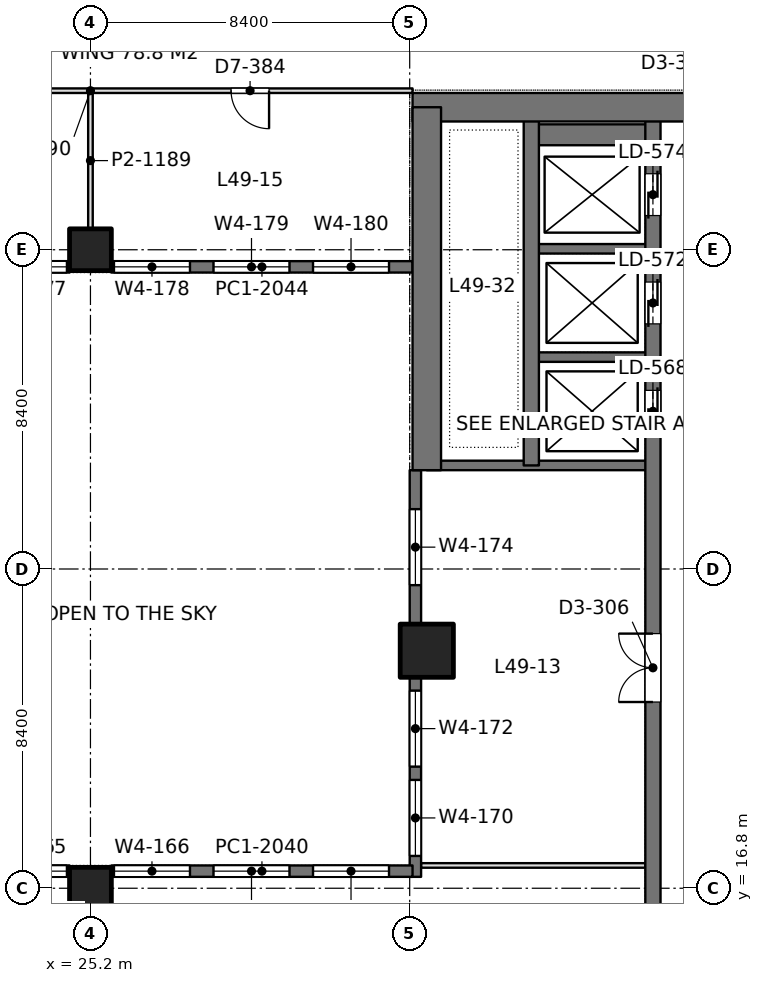
"""IFC4 building model, lengths in metres.
Left out: names, types, materials, properties, quantities, classifications, styles, units other than length and angle.
Written with IfcOpenShell. Run it as: python <this file> out.ifc"""

import sys

from ifc_helpers import new_model, si_unit, direction, frame, frame_2d, origin, origin_2d, place, context, subcontext, project, spatial, rectangle, extrude, element, fill, save


model = new_model("IFC4")
c1 = context("Model", 3, precision=1e-05, world=origin(), true_north=direction((0.0, 1.0)))
c2 = subcontext(c1, "Body", "Model", "MODEL_VIEW")
j1 = project(units=[si_unit("LENGTHUNIT", "METRE"), si_unit("PLANEANGLEUNIT", "RADIAN")], contexts=[c1])
p1 = place(None, origin())
s1 = spatial("IfcSite", under=j1, at=p1, CompositionType="ELEMENT")
p2 = place(p1, origin())
s2 = spatial("IfcBuilding", under=s1, at=p2, CompositionType="ELEMENT")
p3 = place(p2, frame((0.0, 0.0, 215.4)))
s3 = spatial("IfcBuildingStorey", under=s2, at=p3, CompositionType="ELEMENT", Elevation=215.4)
for number, where, z_axis, x_axis in (
    (1, (25.2, 16.8, 0.0), (0.0, 0.0, 1.0), (1.0, 0.0, 0.0)),
    (2, (25.2, 33.6, 0.0), (0.0, 0.0, 1.0), (1.0, 0.0, 0.0)),
):
    element("IfcColumn", number, at=place(p3, frame(where, z_axis=z_axis, x_axis=x_axis)), inside=s3, PredefinedType="COLUMN", context=c2, shape_type="SweptSolid", body=[
        extrude(rectangle(XDim=1.1, YDim=1.1, at=origin_2d()), origin(), (0.0, 0.0, 1.0), 4.2),
    ])
p4 = place(p3, frame((34.05, 23.05, 0.0), z_axis=(0.0, 0.0, 1.0), x_axis=(1.0, 0.0, 0.0)))
e3 = element("IfcColumn", 3, at=p4, inside=s3, PredefinedType="COLUMN", context=c2, shape_type="SweptSolid", body=[
    extrude(rectangle(XDim=1.4, YDim=1.4, at=origin_2d()), origin(), (0.0, 0.0, 1.0), 4.2),
])
p5 = place(p3, frame((33.675, 37.35, 0.0), z_axis=(0.0, 0.0, 1.0), x_axis=(1.0, 0.0, 0.0)))
e4 = element("IfcWall", 4, at=p5, inside=s3, PredefinedType="SHEAR", context=c2, shape_type="SweptSolid", body=[
    extrude(rectangle(XDim=17.85, YDim=0.75, at=frame_2d((8.925, 0.0))), origin(), (0.0, 0.0, 1.0), 4.2),
])
p6 = place(p5, frame((7.175, 0.0, 0.0)))
e5 = element("IfcOpeningElement", 5, at=p6, cuts=e4, PredefinedType="OPENING", context=c2, shape_type="SweptSolid", body=[
    extrude(rectangle(XDim=1.8, YDim=2.4, at=frame_2d((0.9, 1.2))), frame((0.0, 0.385, 0.0), z_axis=(0.0, -1.0, 0.0), x_axis=(1.0, 0.0, 0.0)), (0.0, 0.0, 1.0), 0.77),
])
p7 = place(p3, frame((34.05, 27.8, 0.0), z_axis=(0.0, 0.0, 1.0), x_axis=(0.0, 1.0, 0.0)))
e6 = element("IfcWall", 6, at=p7, inside=s3, PredefinedType="SHEAR", context=c2, shape_type="SweptSolid", body=[
    extrude(rectangle(XDim=9.55, YDim=0.75, at=frame_2d((4.775, 0.0))), origin(), (0.0, 0.0, 1.0), 4.2),
])
p8 = place(p3, frame((40.0, 13.05, 0.0), z_axis=(0.0, 0.0, 1.0), x_axis=(0.0, 1.0, 0.0)))
e7 = element("IfcWall", 7, at=p8, inside=s3, PredefinedType="SHEAR", context=c2, shape_type="SweptSolid", body=[
    extrude(rectangle(XDim=24.3, YDim=0.4, at=frame_2d((12.15, 0.0))), origin(), (0.0, 0.0, 1.0), 4.2),
])
p9 = place(p8, frame((15.75, 0.0, 0.0)))
e8 = element("IfcOpeningElement", 8, at=p9, cuts=e7, PredefinedType="OPENING", context=c2, shape_type="SweptSolid", body=[
    extrude(rectangle(XDim=1.1, YDim=2.2, at=frame_2d((0.55, 1.1))), frame((0.0, 0.21, 0.0), z_axis=(0.0, -1.0, 0.0), x_axis=(1.0, 0.0, 0.0)), (0.0, 0.0, 1.0), 0.42),
])
p10 = place(p8, frame((18.6, 0.0, 0.0)))
e9 = element("IfcOpeningElement", 9, at=p10, cuts=e7, PredefinedType="OPENING", context=c2, shape_type="SweptSolid", body=[
    extrude(rectangle(XDim=1.1, YDim=2.2, at=frame_2d((0.55, 1.1))), frame((0.0, 0.21, 0.0), z_axis=(0.0, -1.0, 0.0), x_axis=(1.0, 0.0, 0.0)), (0.0, 0.0, 1.0), 0.42),
])
p11 = place(p8, frame((21.45, 0.0, 0.0)))
e10 = element("IfcOpeningElement", 10, at=p11, cuts=e7, PredefinedType="OPENING", context=c2, shape_type="SweptSolid", body=[
    extrude(rectangle(XDim=1.1, YDim=2.2, at=frame_2d((0.55, 1.1))), frame((0.0, 0.21, 0.0), z_axis=(0.0, -1.0, 0.0), x_axis=(1.0, 0.0, 0.0)), (0.0, 0.0, 1.0), 0.42),
])
p12 = place(p8, frame((8.65, 0.0, 0.0)))
e11 = element("IfcOpeningElement", 11, at=p12, cuts=e7, PredefinedType="OPENING", context=c2, shape_type="SweptSolid", body=[
    extrude(rectangle(XDim=1.8, YDim=2.4, at=frame_2d((0.9, 1.2))), frame((0.0, 0.21, 0.0), z_axis=(0.0, -1.0, 0.0), x_axis=(1.0, 0.0, 0.0)), (0.0, 0.0, 1.0), 0.42),
])
p13 = place(p3, frame((36.8, 27.925, 0.0), z_axis=(0.0, 0.0, 1.0), x_axis=(0.0, 1.0, 0.0)))
e12 = element("IfcWall", 12, at=p13, inside=s3, PredefinedType="SHEAR", context=c2, shape_type="SweptSolid", body=[
    extrude(rectangle(XDim=9.425, YDim=0.4, at=frame_2d((4.712, 0.0))), origin(), (0.0, 0.0, 1.0), 4.2),
])
p14 = place(p3, frame((40.0, 27.925, 0.0), z_axis=(0.0, 0.0, 1.0), x_axis=(-1.0, 0.0, 0.0)))
e13 = element("IfcWall", 13, at=p14, inside=s3, PredefinedType="SHEAR", context=c2, shape_type="SweptSolid", body=[
    extrude(rectangle(XDim=5.95, YDim=0.25, at=frame_2d((2.975, 0.0))), origin(), (0.0, 0.0, 1.0), 4.2),
])
for number, where, z_axis, x_axis in (
    (14, (40.0, 30.775, 0.0), (0.0, 0.0, 1.0), (-1.0, 0.0, 0.0)),
    (15, (40.0, 33.625, 0.0), (0.0, 0.0, 1.0), (-1.0, 0.0, 0.0)),
):
    element("IfcWall", number, at=place(p3, frame(where, z_axis=z_axis, x_axis=x_axis)), inside=s3, PredefinedType="SHEAR", context=c2, shape_type="SweptSolid", body=[
        extrude(rectangle(XDim=3.2, YDim=0.25, at=frame_2d((1.6, 0.0))), origin(), (0.0, 0.0, 1.0), 4.2),
    ])
p15 = place(p3, frame((40.0, 36.625, 0.0), z_axis=(0.0, 0.0, 1.0), x_axis=(-1.0, 0.0, 0.0)))
e16 = element("IfcWall", 16, at=p15, inside=s3, PredefinedType="SHEAR", context=c2, shape_type="SweptSolid", body=[
    extrude(rectangle(XDim=3.2, YDim=0.55, at=frame_2d((1.6, 0.0))), origin(), (0.0, 0.0, 1.0), 4.2),
])
p16 = place(p3, frame((33.75, 17.1, 0.0), z_axis=(0.0, 0.0, 1.0), x_axis=(0.0, 1.0, 0.0)))
e17 = element("IfcWall", 17, at=p16, inside=s3, PredefinedType="SOLIDWALL", context=c2, shape_type="SweptSolid", body=[
    extrude(rectangle(XDim=10.7, YDim=0.3, at=frame_2d((5.35, 0.0))), origin(), (0.0, 0.0, 1.0), 4.05),
])
p17 = place(p16, frame((0.55, 0.0, 0.9)))
e18 = element("IfcOpeningElement", 18, at=p17, cuts=e17, PredefinedType="OPENING", context=c2, shape_type="SweptSolid", body=[
    extrude(rectangle(XDim=2.0, YDim=1.9, at=frame_2d((1.0, 0.95))), frame((0.0, 0.16, 0.0), z_axis=(0.0, -1.0, 0.0), x_axis=(1.0, 0.0, 0.0)), (0.0, 0.0, 1.0), 0.32),
])
p18 = place(p16, frame((2.9, 0.0, 0.9)))
e19 = element("IfcOpeningElement", 19, at=p18, cuts=e17, PredefinedType="OPENING", context=c2, shape_type="SweptSolid", body=[
    extrude(rectangle(XDim=2.0, YDim=1.9, at=frame_2d((1.0, 0.95))), frame((0.0, 0.16, 0.0), z_axis=(0.0, -1.0, 0.0), x_axis=(1.0, 0.0, 0.0)), (0.0, 0.0, 1.0), 0.32),
])
p19 = place(p16, frame((7.675, 0.0, 0.9)))
e20 = element("IfcOpeningElement", 20, at=p19, cuts=e17, PredefinedType="OPENING", context=c2, shape_type="SweptSolid", body=[
    extrude(rectangle(XDim=2.0, YDim=1.9, at=frame_2d((1.0, 0.95))), frame((0.0, 0.16, 0.0), z_axis=(0.0, -1.0, 0.0), x_axis=(1.0, 0.0, 0.0)), (0.0, 0.0, 1.0), 0.32),
])
p20 = place(p3, frame((16.725, 17.25, 0.0), z_axis=(0.0, 0.0, 1.0), x_axis=(1.0, 0.0, 0.0)))
e21 = element("IfcWall", 21, at=p20, inside=s3, PredefinedType="SOLIDWALL", context=c2, shape_type="SweptSolid", body=[
    extrude(rectangle(XDim=7.925, YDim=0.3, at=frame_2d((3.962, 0.0))), origin(), (0.0, 0.0, 1.0), 4.05),
])
p21 = place(p20, frame((0.619, 0.0, 0.9)))
e22 = element("IfcOpeningElement", 22, at=p21, cuts=e21, PredefinedType="OPENING", context=c2, shape_type="SweptSolid", body=[
    extrude(rectangle(XDim=2.0, YDim=1.9, at=frame_2d((1.0, 0.95))), frame((0.0, 0.16, 0.0), z_axis=(0.0, -1.0, 0.0), x_axis=(1.0, 0.0, 0.0)), (0.0, 0.0, 1.0), 0.32),
])
p22 = place(p20, frame((3.238, 0.0, 0.9)))
e23 = element("IfcOpeningElement", 23, at=p22, cuts=e21, PredefinedType="OPENING", context=c2, shape_type="SweptSolid", body=[
    extrude(rectangle(XDim=2.0, YDim=1.9, at=frame_2d((1.0, 0.95))), frame((0.0, 0.16, 0.0), z_axis=(0.0, -1.0, 0.0), x_axis=(1.0, 0.0, 0.0)), (0.0, 0.0, 1.0), 0.32),
])
p23 = place(p20, frame((5.856, 0.0, 0.9)))
e24 = element("IfcOpeningElement", 24, at=p23, cuts=e21, PredefinedType="OPENING", context=c2, shape_type="SweptSolid", body=[
    extrude(rectangle(XDim=2.0, YDim=1.9, at=frame_2d((1.0, 0.95))), frame((0.0, 0.16, 0.0), z_axis=(0.0, -1.0, 0.0), x_axis=(1.0, 0.0, 0.0)), (0.0, 0.0, 1.0), 0.32),
])
p24 = place(p3, frame((25.75, 17.25, 0.0), z_axis=(0.0, 0.0, 1.0), x_axis=(1.0, 0.0, 0.0)))
e25 = element("IfcWall", 25, at=p24, inside=s3, PredefinedType="SOLIDWALL", context=c2, shape_type="SweptSolid", body=[
    extrude(rectangle(XDim=7.925, YDim=0.3, at=frame_2d((3.962, 0.0))), origin(), (0.0, 0.0, 1.0), 4.05),
])
p25 = place(p24, frame((0.069, 0.0, 0.9)))
e26 = element("IfcOpeningElement", 26, at=p25, cuts=e25, PredefinedType="OPENING", context=c2, shape_type="SweptSolid", body=[
    extrude(rectangle(XDim=2.0, YDim=1.9, at=frame_2d((1.0, 0.95))), frame((0.0, 0.16, 0.0), z_axis=(0.0, -1.0, 0.0), x_axis=(1.0, 0.0, 0.0)), (0.0, 0.0, 1.0), 0.32),
])
p26 = place(p24, frame((2.688, 0.0, 0.9)))
e27 = element("IfcOpeningElement", 27, at=p26, cuts=e25, PredefinedType="OPENING", context=c2, shape_type="SweptSolid", body=[
    extrude(rectangle(XDim=2.0, YDim=1.9, at=frame_2d((1.0, 0.95))), frame((0.0, 0.16, 0.0), z_axis=(0.0, -1.0, 0.0), x_axis=(1.0, 0.0, 0.0)), (0.0, 0.0, 1.0), 0.32),
])
p27 = place(p24, frame((5.306, 0.0, 0.9)))
e28 = element("IfcOpeningElement", 28, at=p27, cuts=e25, PredefinedType="OPENING", context=c2, shape_type="SweptSolid", body=[
    extrude(rectangle(XDim=2.0, YDim=1.9, at=frame_2d((1.0, 0.95))), frame((0.0, 0.16, 0.0), z_axis=(0.0, -1.0, 0.0), x_axis=(1.0, 0.0, 0.0)), (0.0, 0.0, 1.0), 0.32),
])
p28 = place(p3, frame((16.725, 33.15, 0.0), z_axis=(0.0, 0.0, 1.0), x_axis=(1.0, 0.0, 0.0)))
e29 = element("IfcWall", 29, at=p28, inside=s3, PredefinedType="SOLIDWALL", context=c2, shape_type="SweptSolid", body=[
    extrude(rectangle(XDim=7.925, YDim=0.3, at=frame_2d((3.962, 0.0))), origin(), (0.0, 0.0, 1.0), 4.05),
])
p29 = place(p28, frame((0.619, 0.0, 0.9)))
e30 = element("IfcOpeningElement", 30, at=p29, cuts=e29, PredefinedType="OPENING", context=c2, shape_type="SweptSolid", body=[
    extrude(rectangle(XDim=2.0, YDim=1.9, at=frame_2d((1.0, 0.95))), frame((0.0, 0.16, 0.0), z_axis=(0.0, -1.0, 0.0), x_axis=(1.0, 0.0, 0.0)), (0.0, 0.0, 1.0), 0.32),
])
p30 = place(p28, frame((3.238, 0.0, 0.9)))
e31 = element("IfcOpeningElement", 31, at=p30, cuts=e29, PredefinedType="OPENING", context=c2, shape_type="SweptSolid", body=[
    extrude(rectangle(XDim=2.0, YDim=1.9, at=frame_2d((1.0, 0.95))), frame((0.0, 0.16, 0.0), z_axis=(0.0, -1.0, 0.0), x_axis=(1.0, 0.0, 0.0)), (0.0, 0.0, 1.0), 0.32),
])
p31 = place(p28, frame((5.856, 0.0, 0.9)))
e32 = element("IfcOpeningElement", 32, at=p31, cuts=e29, PredefinedType="OPENING", context=c2, shape_type="SweptSolid", body=[
    extrude(rectangle(XDim=2.0, YDim=1.9, at=frame_2d((1.0, 0.95))), frame((0.0, 0.16, 0.0), z_axis=(0.0, -1.0, 0.0), x_axis=(1.0, 0.0, 0.0)), (0.0, 0.0, 1.0), 0.32),
])
p32 = place(p3, frame((25.75, 33.15, 0.0), z_axis=(0.0, 0.0, 1.0), x_axis=(1.0, 0.0, 0.0)))
e33 = element("IfcWall", 33, at=p32, inside=s3, PredefinedType="SOLIDWALL", context=c2, shape_type="SweptSolid", body=[
    extrude(rectangle(XDim=7.925, YDim=0.3, at=frame_2d((3.962, 0.0))), origin(), (0.0, 0.0, 1.0), 4.05),
])
p33 = place(p32, frame((0.069, 0.0, 0.9)))
e34 = element("IfcOpeningElement", 34, at=p33, cuts=e33, PredefinedType="OPENING", context=c2, shape_type="SweptSolid", body=[
    extrude(rectangle(XDim=2.0, YDim=1.9, at=frame_2d((1.0, 0.95))), frame((0.0, 0.16, 0.0), z_axis=(0.0, -1.0, 0.0), x_axis=(1.0, 0.0, 0.0)), (0.0, 0.0, 1.0), 0.32),
])
p34 = place(p32, frame((2.688, 0.0, 0.9)))
e35 = element("IfcOpeningElement", 35, at=p34, cuts=e33, PredefinedType="OPENING", context=c2, shape_type="SweptSolid", body=[
    extrude(rectangle(XDim=2.0, YDim=1.9, at=frame_2d((1.0, 0.95))), frame((0.0, 0.16, 0.0), z_axis=(0.0, -1.0, 0.0), x_axis=(1.0, 0.0, 0.0)), (0.0, 0.0, 1.0), 0.32),
])
p35 = place(p32, frame((5.306, 0.0, 0.9)))
e36 = element("IfcOpeningElement", 36, at=p35, cuts=e33, PredefinedType="OPENING", context=c2, shape_type="SweptSolid", body=[
    extrude(rectangle(XDim=2.0, YDim=1.9, at=frame_2d((1.0, 0.95))), frame((0.0, 0.16, 0.0), z_axis=(0.0, -1.0, 0.0), x_axis=(1.0, 0.0, 0.0)), (0.0, 0.0, 1.0), 0.32),
])
p36 = place(p3, frame((33.898, 17.4, 0.0), z_axis=(0.0, 0.0, 1.0), x_axis=(1.0, 0.0, 0.0)))
e37 = element("IfcWall", 37, at=p36, inside=s3, PredefinedType="PARTITIONING", context=c2, shape_type="SweptSolid", body=[
    extrude(rectangle(XDim=5.904, YDim=0.12, at=frame_2d((2.952, 0.0))), origin(), (0.0, 0.0, 1.0), 3.55),
])
p37 = place(p3, frame((25.2, 34.149, 0.0), z_axis=(0.0, 0.0, 1.0), x_axis=(0.0, 1.0, 0.0)))
e38 = element("IfcWall", 38, at=p37, inside=s3, PredefinedType="PARTITIONING", context=c2, shape_type="SweptSolid", body=[
    extrude(rectangle(XDim=3.593, YDim=0.12, at=frame_2d((1.796, 0.0))), origin(), (0.0, 0.0, 1.0), 3.55),
])
p38 = place(p3, frame((16.725, 37.785, 0.0), z_axis=(0.0, 0.0, 1.0), x_axis=(1.0, 0.0, 0.0)))
e39 = element("IfcWall", 39, at=p38, inside=s3, PredefinedType="PARTITIONING", context=c2, shape_type="SweptSolid", body=[
    extrude(rectangle(XDim=16.95, YDim=0.12, at=frame_2d((8.475, 0.0))), origin(), (0.0, 0.0, 1.0), 3.55),
])
p39 = place(p38, frame((3.775, 0.0, 0.0)))
e40 = element("IfcOpeningElement", 40, at=p39, cuts=e39, PredefinedType="OPENING", context=c2, shape_type="SweptSolid", body=[
    extrude(rectangle(XDim=1.0, YDim=2.4, at=frame_2d((0.5, 1.2))), frame((0.0, 0.07, 0.0), z_axis=(0.0, -1.0, 0.0), x_axis=(1.0, 0.0, 0.0)), (0.0, 0.0, 1.0), 0.14),
])
p40 = place(p38, frame((12.175, 0.0, 0.0)))
e41 = element("IfcOpeningElement", 41, at=p40, cuts=e39, PredefinedType="OPENING", context=c2, shape_type="SweptSolid", body=[
    extrude(rectangle(XDim=1.0, YDim=2.4, at=frame_2d((0.5, 1.2))), frame((0.0, 0.07, 0.0), z_axis=(0.0, -1.0, 0.0), x_axis=(1.0, 0.0, 0.0)), (0.0, 0.0, 1.0), 0.14),
])
p41 = place(p17, origin())
e42 = element("IfcWindow", 42, at=p41, inside=s3, PartitioningType="SINGLE_PANEL", PredefinedType="WINDOW", context=c2, shape_type="SweptSolid", body=[
    extrude(rectangle(XDim=2.0, YDim=1.9, at=frame_2d((1.0, 0.95))), frame((0.0, 0.03, 0.0), z_axis=(0.0, -1.0, 0.0), x_axis=(1.0, 0.0, 0.0)), (0.0, 0.0, 1.0), 0.06),
])
fill(e18, e42)
p42 = place(p18, origin())
e43 = element("IfcWindow", 43, at=p42, inside=s3, PartitioningType="SINGLE_PANEL", PredefinedType="WINDOW", context=c2, shape_type="SweptSolid", body=[
    extrude(rectangle(XDim=2.0, YDim=1.9, at=frame_2d((1.0, 0.95))), frame((0.0, 0.03, 0.0), z_axis=(0.0, -1.0, 0.0), x_axis=(1.0, 0.0, 0.0)), (0.0, 0.0, 1.0), 0.06),
])
fill(e19, e43)
p43 = place(p19, origin())
e44 = element("IfcWindow", 44, at=p43, inside=s3, PartitioningType="SINGLE_PANEL", PredefinedType="WINDOW", context=c2, shape_type="SweptSolid", body=[
    extrude(rectangle(XDim=2.0, YDim=1.9, at=frame_2d((1.0, 0.95))), frame((0.0, 0.03, 0.0), z_axis=(0.0, -1.0, 0.0), x_axis=(1.0, 0.0, 0.0)), (0.0, 0.0, 1.0), 0.06),
])
fill(e20, e44)
p44 = place(p23, origin())
e45 = element("IfcWindow", 45, at=p44, inside=s3, PartitioningType="SINGLE_PANEL", PredefinedType="WINDOW", context=c2, shape_type="SweptSolid", body=[
    extrude(rectangle(XDim=2.0, YDim=1.9, at=frame_2d((1.0, 0.95))), frame((0.0, 0.03, 0.0), z_axis=(0.0, -1.0, 0.0), x_axis=(1.0, 0.0, 0.0)), (0.0, 0.0, 1.0), 0.06),
])
fill(e24, e45)
p45 = place(p25, origin())
e46 = element("IfcWindow", 46, at=p45, inside=s3, PartitioningType="SINGLE_PANEL", PredefinedType="WINDOW", context=c2, shape_type="SweptSolid", body=[
    extrude(rectangle(XDim=2.0, YDim=1.9, at=frame_2d((1.0, 0.95))), frame((0.0, 0.03, 0.0), z_axis=(0.0, -1.0, 0.0), x_axis=(1.0, 0.0, 0.0)), (0.0, 0.0, 1.0), 0.06),
])
fill(e26, e46)
p46 = place(p26, origin())
e47 = element("IfcWindow", 47, at=p46, inside=s3, PartitioningType="SINGLE_PANEL", PredefinedType="WINDOW", context=c2, shape_type="SweptSolid", body=[
    extrude(rectangle(XDim=2.0, YDim=1.9, at=frame_2d((1.0, 0.95))), frame((0.0, 0.03, 0.0), z_axis=(0.0, -1.0, 0.0), x_axis=(1.0, 0.0, 0.0)), (0.0, 0.0, 1.0), 0.06),
])
fill(e27, e47)
p47 = place(p27, origin())
e48 = element("IfcWindow", 48, at=p47, inside=s3, PartitioningType="SINGLE_PANEL", PredefinedType="WINDOW", context=c2, shape_type="SweptSolid", body=[
    extrude(rectangle(XDim=2.0, YDim=1.9, at=frame_2d((1.0, 0.95))), frame((0.0, 0.03, 0.0), z_axis=(0.0, -1.0, 0.0), x_axis=(1.0, 0.0, 0.0)), (0.0, 0.0, 1.0), 0.06),
])
fill(e28, e48)
p48 = place(p31, origin())
e49 = element("IfcWindow", 49, at=p48, inside=s3, PartitioningType="SINGLE_PANEL", PredefinedType="WINDOW", context=c2, shape_type="SweptSolid", body=[
    extrude(rectangle(XDim=2.0, YDim=1.9, at=frame_2d((1.0, 0.95))), frame((0.0, 0.03, 0.0), z_axis=(0.0, -1.0, 0.0), x_axis=(1.0, 0.0, 0.0)), (0.0, 0.0, 1.0), 0.06),
])
fill(e32, e49)
p49 = place(p33, origin())
e50 = element("IfcWindow", 50, at=p49, inside=s3, PartitioningType="SINGLE_PANEL", PredefinedType="WINDOW", context=c2, shape_type="SweptSolid", body=[
    extrude(rectangle(XDim=2.0, YDim=1.9, at=frame_2d((1.0, 0.95))), frame((0.0, 0.03, 0.0), z_axis=(0.0, -1.0, 0.0), x_axis=(1.0, 0.0, 0.0)), (0.0, 0.0, 1.0), 0.06),
])
fill(e34, e50)
p50 = place(p34, origin())
e51 = element("IfcWindow", 51, at=p50, inside=s3, PartitioningType="SINGLE_PANEL", PredefinedType="WINDOW", context=c2, shape_type="SweptSolid", body=[
    extrude(rectangle(XDim=2.0, YDim=1.9, at=frame_2d((1.0, 0.95))), frame((0.0, 0.03, 0.0), z_axis=(0.0, -1.0, 0.0), x_axis=(1.0, 0.0, 0.0)), (0.0, 0.0, 1.0), 0.06),
])
fill(e35, e51)
p51 = place(p35, origin())
e52 = element("IfcWindow", 52, at=p51, inside=s3, PartitioningType="SINGLE_PANEL", PredefinedType="WINDOW", context=c2, shape_type="SweptSolid", body=[
    extrude(rectangle(XDim=2.0, YDim=1.9, at=frame_2d((1.0, 0.95))), frame((0.0, 0.03, 0.0), z_axis=(0.0, -1.0, 0.0), x_axis=(1.0, 0.0, 0.0)), (0.0, 0.0, 1.0), 0.06),
])
fill(e36, e52)
p52 = place(p9, origin())
e53 = element("IfcDoor", 53, at=p52, inside=s3, OperationType="DOUBLE_DOOR_SLIDING", PredefinedType="DOOR", context=c2, shape_type="SweptSolid", body=[
    extrude(rectangle(XDim=1.1, YDim=2.2, at=frame_2d((0.55, 1.1))), frame((0.0, 0.025, 0.0), z_axis=(0.0, -1.0, 0.0), x_axis=(1.0, 0.0, 0.0)), (0.0, 0.0, 1.0), 0.05),
])
fill(e8, e53)
p53 = place(p10, origin())
e54 = element("IfcDoor", 54, at=p53, inside=s3, OperationType="DOUBLE_DOOR_SLIDING", PredefinedType="DOOR", context=c2, shape_type="SweptSolid", body=[
    extrude(rectangle(XDim=1.1, YDim=2.2, at=frame_2d((0.55, 1.1))), frame((0.0, 0.025, 0.0), z_axis=(0.0, -1.0, 0.0), x_axis=(1.0, 0.0, 0.0)), (0.0, 0.0, 1.0), 0.05),
])
fill(e9, e54)
p54 = place(p11, origin())
e55 = element("IfcDoor", 55, at=p54, inside=s3, OperationType="DOUBLE_DOOR_SLIDING", PredefinedType="DOOR", context=c2, shape_type="SweptSolid", body=[
    extrude(rectangle(XDim=1.1, YDim=2.2, at=frame_2d((0.55, 1.1))), frame((0.0, 0.025, 0.0), z_axis=(0.0, -1.0, 0.0), x_axis=(1.0, 0.0, 0.0)), (0.0, 0.0, 1.0), 0.05),
])
fill(e10, e55)
p55 = place(p12, origin())
e56 = element("IfcDoor", 56, at=p55, inside=s3, OperationType="DOUBLE_DOOR_SINGLE_SWING", PredefinedType="DOOR", context=c2, shape_type="SweptSolid", body=[
    extrude(rectangle(XDim=1.8, YDim=2.4, at=frame_2d((0.9, 1.2))), frame((0.0, 0.025, 0.0), z_axis=(0.0, -1.0, 0.0), x_axis=(1.0, 0.0, 0.0)), (0.0, 0.0, 1.0), 0.05),
])
fill(e11, e56)
p56 = place(p40, frame((1.0, 0.0, 0.0), z_axis=(0.0, 0.0, 1.0), x_axis=(-1.0, 0.0, 0.0)))
e57 = element("IfcDoor", 57, at=p56, inside=s3, OperationType="SINGLE_SWING_LEFT", PredefinedType="DOOR", context=c2, shape_type="SweptSolid", body=[
    extrude(rectangle(XDim=1.0, YDim=2.4, at=frame_2d((0.5, 1.2))), frame((0.0, 0.025, 0.0), z_axis=(0.0, -1.0, 0.0), x_axis=(1.0, 0.0, 0.0)), (0.0, 0.0, 1.0), 0.05),
])
fill(e41, e57)
save(model, sys.argv[1])
